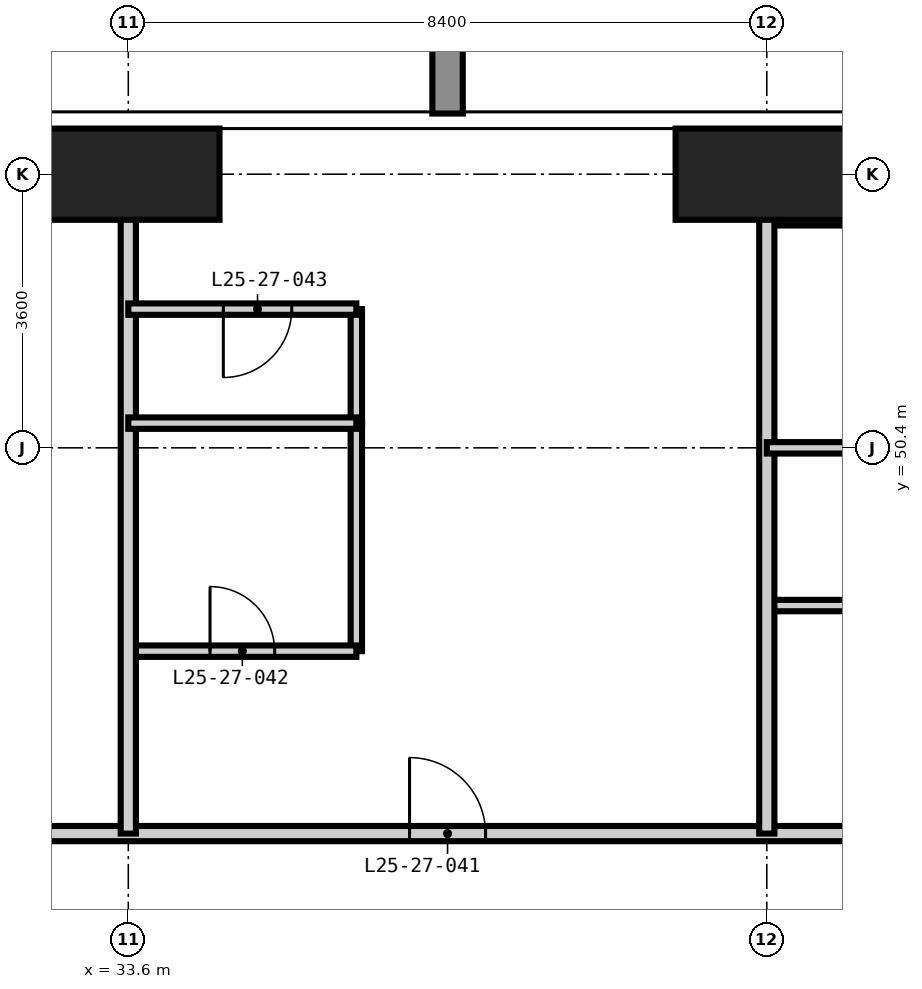
"""IFC4 building model, lengths in metres.
Left out: names, types, materials, properties, quantities, classifications, styles, units other than length and angle.
Written with IfcOpenShell. Run it as: python <this file> out.ifc"""

import sys

from ifc_helpers import new_model, si_unit, direction, frame, frame_2d, origin, origin_2d, place, context, subcontext, project, spatial, rectangle, extrude, element, fill, save


model = new_model("IFC4")
c1 = context("Model", 3, precision=1e-05, world=origin(), true_north=direction((0.0, 1.0)))
c2 = subcontext(c1, "Body", "Model", "MODEL_VIEW")
j1 = project(units=[si_unit("LENGTHUNIT", "METRE"), si_unit("PLANEANGLEUNIT", "RADIAN")], contexts=[c1])
p1 = place(None, origin())
s1 = spatial("IfcSite", under=j1, at=p1, CompositionType="ELEMENT")
p2 = place(p1, origin())
s2 = spatial("IfcBuilding", under=s1, at=p2, CompositionType="ELEMENT")
p3 = place(p2, frame((0.0, 0.0, 100.8)))
s3 = spatial("IfcBuildingStorey", under=s2, at=p3, CompositionType="ELEMENT", Elevation=100.8)
for number, where, z_axis, x_axis in (
    (1, (33.6, 54.0, -0.35), (0.0, 0.0, 1.0), (1.0, 0.0, 0.0)),
    (2, (42.0, 54.0, -0.35), (0.0, 0.0, 1.0), (1.0, 0.0, 0.0)),
):
    element("IfcColumn", number, at=place(p3, frame(where, z_axis=z_axis, x_axis=x_axis)), inside=s3, PredefinedType="COLUMN", context=c2, shape_type="SweptSolid", body=[
        extrude(rectangle(XDim=2.4, YDim=1.2, at=origin_2d()), origin(), (0.0, 0.0, 1.0), 3.6),
    ])
p4 = place(p3, frame((36.6, 47.725, 0.0), z_axis=(0.0, 0.0, 1.0), x_axis=(0.0, 1.0, 0.0)))
e3 = element("IfcWall", 3, at=p4, inside=s3, PredefinedType="PARTITIONING", context=c2, shape_type="SweptSolid", body=[
    extrude(rectangle(XDim=3.0, YDim=0.15, at=frame_2d((1.5, 0.0))), origin(), (0.0, 0.0, 1.0), 3.25),
])
p5 = place(p3, frame((33.6, 47.725, 0.0), z_axis=(0.0, 0.0, 1.0), x_axis=(1.0, 0.0, 0.0)))
e4 = element("IfcWall", 4, at=p5, inside=s3, PredefinedType="PARTITIONING", context=c2, shape_type="SweptSolid", body=[
    extrude(rectangle(XDim=3.0, YDim=0.15, at=frame_2d((1.5, 0.0))), origin(), (0.0, 0.0, 1.0), 3.25),
])
p6 = place(p5, frame((1.075, 0.0, 0.0)))
e5 = element("IfcOpeningElement", 5, at=p6, cuts=e4, PredefinedType="OPENING", context=c2, shape_type="SweptSolid", body=[
    extrude(rectangle(XDim=0.85, YDim=2.1, at=frame_2d((0.425, 1.05))), frame((0.0, 0.085, 0.0), z_axis=(0.0, -1.0, 0.0), x_axis=(1.0, 0.0, 0.0)), (0.0, 0.0, 1.0), 0.17),
])
p7 = place(p3, frame((42.0, 48.325, 0.0), z_axis=(0.0, 0.0, 1.0), x_axis=(1.0, 0.0, 0.0)))
e6 = element("IfcWall", 6, at=p7, inside=s3, PredefinedType="PARTITIONING", context=c2, shape_type="SweptSolid", body=[
    extrude(rectangle(XDim=3.925, YDim=0.15, at=frame_2d((1.962, 0.0))), origin(), (0.0, 0.0, 1.0), 3.25),
])
p8 = place(p7, frame((1.538, 0.0, 0.0)))
e7 = element("IfcOpeningElement", 7, at=p8, cuts=e6, PredefinedType="OPENING", context=c2, shape_type="SweptSolid", body=[
    extrude(rectangle(XDim=0.85, YDim=2.1, at=frame_2d((0.425, 1.05))), frame((0.0, 0.085, 0.0), z_axis=(0.0, -1.0, 0.0), x_axis=(1.0, 0.0, 0.0)), (0.0, 0.0, 1.0), 0.17),
])
p9 = place(p3, frame((42.0, 53.4, 0.0), z_axis=(0.0, 0.0, 1.0), x_axis=(1.0, 0.0, 0.0)))
e8 = element("IfcWall", 8, at=p9, inside=s3, PredefinedType="PARTITIONING", context=c2, shape_type="SweptSolid", body=[
    extrude(rectangle(XDim=3.6, YDim=0.15, at=frame_2d((1.8, 0.0))), origin(), (0.0, 0.0, 1.0), 3.25),
])
p10 = place(p9, frame((1.375, 0.0, 0.0)))
e9 = element("IfcOpeningElement", 9, at=p10, cuts=e8, PredefinedType="OPENING", context=c2, shape_type="SweptSolid", body=[
    extrude(rectangle(XDim=0.85, YDim=2.1, at=frame_2d((0.425, 1.05))), frame((0.0, 0.085, 0.0), z_axis=(0.0, -1.0, 0.0), x_axis=(1.0, 0.0, 0.0)), (0.0, 0.0, 1.0), 0.17),
])
p11 = place(p3, frame((12.6, 45.325, 0.0), z_axis=(0.0, 0.0, 1.0), x_axis=(1.0, 0.0, 0.0)))
e10 = element("IfcWall", 10, at=p11, inside=s3, PredefinedType="PARTITIONING", context=c2, shape_type="SweptSolid", body=[
    extrude(rectangle(XDim=33.325, YDim=0.2, at=frame_2d((16.663, 0.0))), origin(), (0.0, 0.0, 1.0), 3.25),
])
p12 = place(p11, frame((7.9, 0.0, 0.0)))
e11 = element("IfcOpeningElement", 11, at=p12, cuts=e10, PredefinedType="OPENING", context=c2, shape_type="SweptSolid", body=[
    extrude(rectangle(XDim=1.0, YDim=2.2, at=frame_2d((0.5, 1.1))), frame((0.0, 0.11, 0.0), z_axis=(0.0, -1.0, 0.0), x_axis=(1.0, 0.0, 0.0)), (0.0, 0.0, 1.0), 0.22),
])
p13 = place(p11, frame((16.3, 0.0, 0.0)))
e12 = element("IfcOpeningElement", 12, at=p13, cuts=e10, PredefinedType="OPENING", context=c2, shape_type="SweptSolid", body=[
    extrude(rectangle(XDim=1.0, YDim=2.2, at=frame_2d((0.5, 1.1))), frame((0.0, 0.11, 0.0), z_axis=(0.0, -1.0, 0.0), x_axis=(1.0, 0.0, 0.0)), (0.0, 0.0, 1.0), 0.22),
])
p14 = place(p11, frame((24.7, 0.0, 0.0)))
e13 = element("IfcOpeningElement", 13, at=p14, cuts=e10, PredefinedType="OPENING", context=c2, shape_type="SweptSolid", body=[
    extrude(rectangle(XDim=1.0, YDim=2.2, at=frame_2d((0.5, 1.1))), frame((0.0, 0.11, 0.0), z_axis=(0.0, -1.0, 0.0), x_axis=(1.0, 0.0, 0.0)), (0.0, 0.0, 1.0), 0.22),
])
for number, where, z_axis, x_axis in (
    (14, (33.6, 45.325, 0.0), (0.0, 0.0, 1.0), (0.0, 1.0, 0.0)),
    (15, (42.0, 45.325, 0.0), (0.0, 0.0, 1.0), (0.0, 1.0, 0.0)),
):
    element("IfcWall", number, at=place(p3, frame(where, z_axis=z_axis, x_axis=x_axis)), inside=s3, PredefinedType="PARTITIONING", context=c2, shape_type="SweptSolid", body=[
        extrude(rectangle(XDim=9.293, YDim=0.2, at=frame_2d((4.646, 0.0))), origin(), (0.0, 0.0, 1.0), 3.25),
    ])
p15 = place(p3, frame((36.6, 50.725, 0.0), z_axis=(0.0, 0.0, 1.0), x_axis=(0.0, 1.0, 0.0)))
e16 = element("IfcWall", 16, at=p15, inside=s3, PredefinedType="PARTITIONING", context=c2, shape_type="SweptSolid", body=[
    extrude(rectangle(XDim=1.5, YDim=0.15, at=frame_2d((0.75, 0.0))), origin(), (0.0, 0.0, 1.0), 3.25),
])
p16 = place(p3, frame((42.0, 50.4, 0.0), z_axis=(0.0, 0.0, 1.0), x_axis=(1.0, 0.0, 0.0)))
e17 = element("IfcWall", 17, at=p16, inside=s3, PredefinedType="PARTITIONING", context=c2, shape_type="SweptSolid", body=[
    extrude(rectangle(XDim=12.618, YDim=0.15, at=frame_2d((6.309, 0.0))), origin(), (0.0, 0.0, 1.0), 3.25),
])
p17 = place(p16, frame((8.85, 0.0, 0.0)))
e18 = element("IfcOpeningElement", 18, at=p17, cuts=e17, PredefinedType="OPENING", context=c2, shape_type="SweptSolid", body=[
    extrude(rectangle(XDim=0.9, YDim=2.1, at=frame_2d((0.45, 1.05))), frame((0.0, 0.085, 0.0), z_axis=(0.0, -1.0, 0.0), x_axis=(1.0, 0.0, 0.0)), (0.0, 0.0, 1.0), 0.17),
])
p18 = place(p3, frame((33.6, 50.725, 0.0), z_axis=(0.0, 0.0, 1.0), x_axis=(1.0, 0.0, 0.0)))
e19 = element("IfcWall", 19, at=p18, inside=s3, PredefinedType="PARTITIONING", context=c2, shape_type="SweptSolid", body=[
    extrude(rectangle(XDim=3.0, YDim=0.15, at=frame_2d((1.5, 0.0))), origin(), (0.0, 0.0, 1.0), 3.25),
])
p19 = place(p3, frame((33.6, 52.225, 0.0), z_axis=(0.0, 0.0, 1.0), x_axis=(1.0, 0.0, 0.0)))
e20 = element("IfcWall", 20, at=p19, inside=s3, PredefinedType="PARTITIONING", context=c2, shape_type="SweptSolid", body=[
    extrude(rectangle(XDim=3.0, YDim=0.15, at=frame_2d((1.5, 0.0))), origin(), (0.0, 0.0, 1.0), 3.25),
])
p20 = place(p19, frame((1.25, 0.0, 0.0)))
e21 = element("IfcOpeningElement", 21, at=p20, cuts=e20, PredefinedType="OPENING", context=c2, shape_type="SweptSolid", body=[
    extrude(rectangle(XDim=0.9, YDim=2.1, at=frame_2d((0.45, 1.05))), frame((0.0, 0.085, 0.0), z_axis=(0.0, -1.0, 0.0), x_axis=(1.0, 0.0, 0.0)), (0.0, 0.0, 1.0), 0.17),
])
p21 = place(p14, origin())
e22 = element("IfcDoor", 22, at=p21, inside=s3, OperationType="SINGLE_SWING_LEFT", PredefinedType="DOOR", context=c2, shape_type="SweptSolid", body=[
    extrude(rectangle(XDim=1.0, YDim=2.2, at=frame_2d((0.5, 1.1))), frame((0.0, 0.025, 0.0), z_axis=(0.0, -1.0, 0.0), x_axis=(1.0, 0.0, 0.0)), (0.0, 0.0, 1.0), 0.05),
])
fill(e13, e22)
p22 = place(p6, origin())
e23 = element("IfcDoor", 23, at=p22, inside=s3, OperationType="SINGLE_SWING_LEFT", PredefinedType="DOOR", context=c2, shape_type="SweptSolid", body=[
    extrude(rectangle(XDim=0.85, YDim=2.1, at=frame_2d((0.425, 1.05))), frame((0.0, 0.025, 0.0), z_axis=(0.0, -1.0, 0.0), x_axis=(1.0, 0.0, 0.0)), (0.0, 0.0, 1.0), 0.05),
])
fill(e5, e23)
p23 = place(p20, frame((0.9, 0.0, 0.0), z_axis=(0.0, 0.0, 1.0), x_axis=(-1.0, 0.0, 0.0)))
e24 = element("IfcDoor", 24, at=p23, inside=s3, OperationType="SINGLE_SWING_RIGHT", PredefinedType="DOOR", context=c2, shape_type="SweptSolid", body=[
    extrude(rectangle(XDim=0.9, YDim=2.1, at=frame_2d((0.45, 1.05))), frame((0.0, 0.025, 0.0), z_axis=(0.0, -1.0, 0.0), x_axis=(1.0, 0.0, 0.0)), (0.0, 0.0, 1.0), 0.05),
])
fill(e21, e24)
save(model, sys.argv[1])
